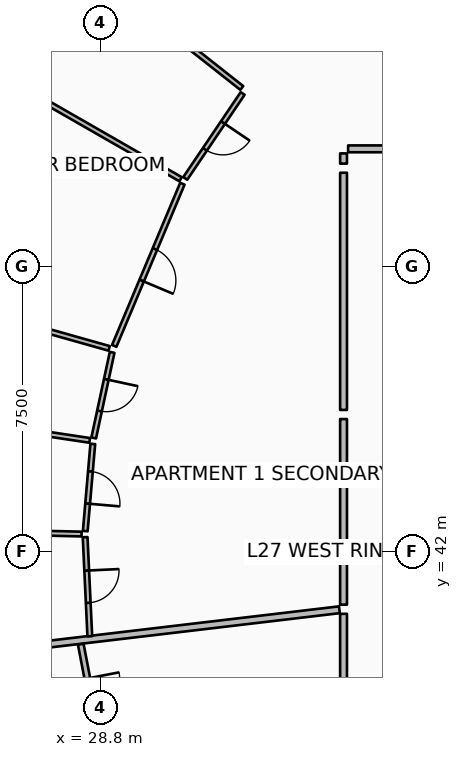
"""IFC4 building model, lengths in metres.
Left out: names, types, materials, properties, quantities, classifications, styles, units other than length and angle.
Written with IfcOpenShell. Run it as: python <this file> out.ifc"""

import sys

from ifc_helpers import new_model, si_unit, direction, frame, frame_2d, origin, place, context, subcontext, project, spatial, rectangle, extrude, element, fill, save


model = new_model("IFC4")
c1 = context("Model", 3, precision=1e-05, world=origin(), true_north=direction((0.0, 1.0)))
c2 = subcontext(c1, "Body", "Model", "MODEL_VIEW")
j1 = project(units=[si_unit("LENGTHUNIT", "METRE"), si_unit("PLANEANGLEUNIT", "RADIAN")], contexts=[c1])
p1 = place(None, origin())
s1 = spatial("IfcSite", under=j1, at=p1, CompositionType="ELEMENT")
p2 = place(p1, origin())
s2 = spatial("IfcBuilding", under=s1, at=p2, CompositionType="ELEMENT")
p3 = place(p2, frame((0.0, 0.0, 108.9)))
s3 = spatial("IfcBuildingStorey", under=s2, at=p3, CompositionType="ELEMENT", Elevation=108.9)
p4 = place(p3, frame((35.091, 40.472, 0.0), z_axis=(0.0, 0.0, 1.0), x_axis=(-0.99306845132, -0.117537445069, 0.0)))
e1 = element("IfcWall", 1, at=p4, inside=s3, PredefinedType="PARTITIONING", context=c2, shape_type="SweptSolid", body=[
    extrude(rectangle(XDim=16.48, YDim=0.18, at=frame_2d((8.24, 0.0))), origin(), (0.0, 0.0, 1.0), 2.94),
])
p5 = place(p3, frame((41.944, 52.6, 0.0), z_axis=(0.0, 0.0, 1.0), x_axis=(-1.0, 0.0, 0.0)))
e2 = element("IfcWall", 2, at=p5, inside=s3, PredefinedType="PARTITIONING", context=c2, shape_type="SweptSolid", body=[
    extrude(rectangle(XDim=6.624, YDim=0.18, at=frame_2d((3.312, 0.0))), origin(), (0.0, 0.0, 1.0), 2.94),
])
p6 = place(p5, frame((2.762, 0.0, 0.0)))
e3 = element("IfcOpeningElement", 3, at=p6, cuts=e2, PredefinedType="OPENING", context=c2, shape_type="SweptSolid", body=[
    extrude(rectangle(XDim=1.1, YDim=2.1, at=frame_2d((0.55, 1.05))), frame((0.0, 0.1, 0.0), z_axis=(0.0, -1.0, 0.0), x_axis=(1.0, 0.0, 0.0)), (0.0, 0.0, 1.0), 0.2),
])
p7 = place(p3, frame((35.2, 52.48, 0.0), z_axis=(0.0, 0.0, 1.0), x_axis=(0.0, -1.0, 0.0)))
e4 = element("IfcWall", 4, at=p7, inside=s3, PredefinedType="PARTITIONING", context=c2, shape_type="SweptSolid", body=[
    extrude(rectangle(XDim=0.269, YDim=0.18, at=frame_2d((0.135, 0.0))), origin(), (0.0, 0.0, 1.0), 2.94),
])
p8 = place(p3, frame((35.2, 51.971, 0.0), z_axis=(0.0, 0.0, 1.0), x_axis=(0.0, -1.0, 0.0)))
e5 = element("IfcWall", 5, at=p8, inside=s3, PredefinedType="PARTITIONING", context=c2, shape_type="SweptSolid", body=[
    extrude(rectangle(XDim=6.241, YDim=0.18, at=frame_2d((3.12, 0.0))), origin(), (0.0, 0.0, 1.0), 2.94),
])
p9 = place(p3, frame((32.522, 54.202, 0.0), z_axis=(0.0, 0.0, 1.0), x_axis=(-0.785296086335, 0.619120389574, 0.0)))
e6 = element("IfcWall", 6, at=p9, inside=s3, PredefinedType="PARTITIONING", context=c2, shape_type="SweptSolid", body=[
    extrude(rectangle(XDim=6.529, YDim=0.125, at=frame_2d((3.265, 0.0))), origin(), (0.0, 0.0, 1.0), 2.94),
])
p10 = place(p3, frame((30.912, 51.8, 0.0), z_axis=(0.0, 0.0, 1.0), x_axis=(-0.867452705788, 0.497519651091, 0.0)))
e7 = element("IfcWall", 7, at=p10, inside=s3, PredefinedType="PARTITIONING", context=c2, shape_type="SweptSolid", body=[
    extrude(rectangle(XDim=6.814, YDim=0.125, at=frame_2d((3.407, 0.0))), origin(), (0.0, 0.0, 1.0), 2.94),
])
p11 = place(p3, frame((32.545, 54.057, 0.0), z_axis=(0.0, 0.0, 1.0), x_axis=(-0.559849013212, -0.828594642998, 0.0)))
e8 = element("IfcWall", 8, at=p11, inside=s3, PredefinedType="PARTITIONING", context=c2, shape_type="SweptSolid", body=[
    extrude(rectangle(XDim=2.697, YDim=0.125, at=frame_2d((1.349, 0.0))), origin(), (0.0, 0.0, 1.0), 2.94),
])
p12 = place(p11, frame((0.924, 0.0, 0.0)))
e9 = element("IfcOpeningElement", 9, at=p12, cuts=e8, PredefinedType="OPENING", context=c2, shape_type="SweptSolid", body=[
    extrude(rectangle(XDim=0.85, YDim=2.06, at=frame_2d((0.425, 1.03))), frame((0.0, 0.073, 0.0), z_axis=(0.0, -1.0, 0.0), x_axis=(1.0, 0.0, 0.0)), (0.0, 0.0, 1.0), 0.145),
])
p13 = place(p3, frame((30.959, 51.682, 0.0), z_axis=(0.0, 0.0, 1.0), x_axis=(-0.387377754923, -0.921921078505, 0.0)))
e10 = element("IfcWall", 10, at=p13, inside=s3, PredefinedType="PARTITIONING", context=c2, shape_type="SweptSolid", body=[
    extrude(rectangle(XDim=4.628, YDim=0.125, at=frame_2d((2.314, 0.0))), origin(), (0.0, 0.0, 1.0), 2.94),
])
p14 = place(p13, frame((1.864, 0.0, 0.0)))
e11 = element("IfcOpeningElement", 11, at=p14, cuts=e10, PredefinedType="OPENING", context=c2, shape_type="SweptSolid", body=[
    extrude(rectangle(XDim=0.9, YDim=2.08, at=frame_2d((0.45, 1.04))), frame((0.0, 0.073, 0.0), z_axis=(0.0, -1.0, 0.0), x_axis=(1.0, 0.0, 0.0)), (0.0, 0.0, 1.0), 0.145),
])
p15 = place(p3, frame((35.2, 45.49, 0.0), z_axis=(0.0, 0.0, 1.0), x_axis=(0.0, -1.0, 0.0)))
e12 = element("IfcWall", 12, at=p15, inside=s3, PredefinedType="PARTITIONING", context=c2, shape_type="SweptSolid", body=[
    extrude(rectangle(XDim=4.885, YDim=0.18, at=frame_2d((2.442, 0.0))), origin(), (0.0, 0.0, 1.0), 2.94),
])
p16 = place(p3, frame((29.031, 47.35, 0.0), z_axis=(0.0, 0.0, 1.0), x_axis=(-0.962455027906, 0.271441189317, 0.0)))
e13 = element("IfcWall", 13, at=p16, inside=s3, PredefinedType="PARTITIONING", context=c2, shape_type="SweptSolid", body=[
    extrude(rectangle(XDim=8.862, YDim=0.125, at=frame_2d((4.431, 0.0))), origin(), (0.0, 0.0, 1.0), 2.94),
])
p17 = place(p3, frame((28.52, 44.929, 0.0), z_axis=(0.0, 0.0, 1.0), x_axis=(-0.988886383278, 0.148673201912, 0.0)))
e14 = element("IfcWall", 14, at=p17, inside=s3, PredefinedType="PARTITIONING", context=c2, shape_type="SweptSolid", body=[
    extrude(rectangle(XDim=8.969, YDim=0.125, at=frame_2d((4.485, 0.0))), origin(), (0.0, 0.0, 1.0), 2.94),
])
p18 = place(p3, frame((28.306, 42.464, 0.0), z_axis=(0.0, 0.0, 1.0), x_axis=(-0.999722179252, 0.023570411771, 0.0)))
e15 = element("IfcWall", 15, at=p18, inside=s3, PredefinedType="PARTITIONING", context=c2, shape_type="SweptSolid", body=[
    extrude(rectangle(XDim=9.426, YDim=0.125, at=frame_2d((4.713, 0.0))), origin(), (0.0, 0.0, 1.0), 2.94),
])
p19 = place(p3, frame((29.11, 47.244, 0.0), z_axis=(0.0, 0.0, 1.0), x_axis=(-0.210470334655, -0.977600244594, 0.0)))
e16 = element("IfcWall", 16, at=p19, inside=s3, PredefinedType="PARTITIONING", context=c2, shape_type="SweptSolid", body=[
    extrude(rectangle(XDim=2.302, YDim=0.125, at=frame_2d((1.151, 0.0))), origin(), (0.0, 0.0, 1.0), 2.94),
])
p20 = place(p19, frame((0.726, 0.0, 0.0)))
e17 = element("IfcOpeningElement", 17, at=p20, cuts=e16, PredefinedType="OPENING", context=c2, shape_type="SweptSolid", body=[
    extrude(rectangle(XDim=0.85, YDim=2.06, at=frame_2d((0.425, 1.03))), frame((0.0, 0.073, 0.0), z_axis=(0.0, -1.0, 0.0), x_axis=(1.0, 0.0, 0.0)), (0.0, 0.0, 1.0), 0.145),
])
p21 = place(p3, frame((28.602, 44.836, 0.0), z_axis=(0.0, 0.0, 1.0), x_axis=(-0.086309330274, -0.996268387287, 0.0)))
e18 = element("IfcWall", 18, at=p21, inside=s3, PredefinedType="PARTITIONING", context=c2, shape_type="SweptSolid", body=[
    extrude(rectangle(XDim=2.302, YDim=0.125, at=frame_2d((1.151, 0.0))), origin(), (0.0, 0.0, 1.0), 2.94),
])
p22 = place(p21, frame((0.726, 0.0, 0.0)))
e19 = element("IfcOpeningElement", 19, at=p22, cuts=e18, PredefinedType="OPENING", context=c2, shape_type="SweptSolid", body=[
    extrude(rectangle(XDim=0.85, YDim=2.06, at=frame_2d((0.425, 1.03))), frame((0.0, 0.073, 0.0), z_axis=(0.0, -1.0, 0.0), x_axis=(1.0, 0.0, 0.0)), (0.0, 0.0, 1.0), 0.145),
])
p23 = place(p3, frame((28.4, 42.382, 0.0), z_axis=(0.0, 0.0, 1.0), x_axis=(0.047147361322, -0.998887944827, 0.0)))
e20 = element("IfcWall", 20, at=p23, inside=s3, PredefinedType="PARTITIONING", context=c2, shape_type="SweptSolid", body=[
    extrude(rectangle(XDim=2.61, YDim=0.125, at=frame_2d((1.305, 0.0))), origin(), (0.0, 0.0, 1.0), 2.94),
])
p24 = place(p23, frame((0.88, 0.0, 0.0)))
e21 = element("IfcOpeningElement", 21, at=p24, cuts=e20, PredefinedType="OPENING", context=c2, shape_type="SweptSolid", body=[
    extrude(rectangle(XDim=0.85, YDim=2.06, at=frame_2d((0.425, 1.03))), frame((0.0, 0.073, 0.0), z_axis=(0.0, -1.0, 0.0), x_axis=(1.0, 0.0, 0.0)), (0.0, 0.0, 1.0), 0.145),
])
p25 = place(p3, frame((35.2, 40.365, 0.0), z_axis=(0.0, 0.0, 1.0), x_axis=(0.0, -1.0, 0.0)))
e22 = element("IfcWall", 22, at=p25, inside=s3, PredefinedType="PARTITIONING", context=c2, shape_type="SweptSolid", body=[
    extrude(rectangle(XDim=5.413, YDim=0.18, at=frame_2d((2.707, 0.0))), origin(), (0.0, 0.0, 1.0), 2.94),
])
p26 = place(p3, frame((28.285, 39.566, 0.0), z_axis=(0.0, 0.0, 1.0), x_axis=(0.189069796262, -0.98196365113, 0.0)))
e23 = element("IfcWall", 23, at=p26, inside=s3, PredefinedType="PARTITIONING", context=c2, shape_type="SweptSolid", body=[
    extrude(rectangle(XDim=2.687, YDim=0.15, at=frame_2d((1.344, 0.0))), origin(), (0.0, 0.0, 1.0), 2.94),
])
p27 = place(p26, frame((0.918, 0.0, 0.0)))
e24 = element("IfcOpeningElement", 24, at=p27, cuts=e23, PredefinedType="OPENING", context=c2, shape_type="SweptSolid", body=[
    extrude(rectangle(XDim=0.85, YDim=2.06, at=frame_2d((0.425, 1.03))), frame((0.0, 0.085, 0.0), z_axis=(0.0, -1.0, 0.0), x_axis=(1.0, 0.0, 0.0)), (0.0, 0.0, 1.0), 0.17),
])
p28 = place(p12, origin())
e25 = element("IfcDoor", 25, at=p28, inside=s3, OperationType="SINGLE_SWING_LEFT", PredefinedType="DOOR", context=c2, shape_type="SweptSolid", body=[
    extrude(rectangle(XDim=0.85, YDim=2.06, at=frame_2d((0.425, 1.03))), frame((0.0, 0.025, 0.0), z_axis=(0.0, -1.0, 0.0), x_axis=(1.0, 0.0, 0.0)), (0.0, 0.0, 1.0), 0.05),
])
fill(e9, e25)
p29 = place(p14, origin())
e26 = element("IfcDoor", 26, at=p29, inside=s3, OperationType="SINGLE_SWING_RIGHT", PredefinedType="DOOR", context=c2, shape_type="SweptSolid", body=[
    extrude(rectangle(XDim=0.9, YDim=2.08, at=frame_2d((0.45, 1.04))), frame((0.0, 0.025, 0.0), z_axis=(0.0, -1.0, 0.0), x_axis=(1.0, 0.0, 0.0)), (0.0, 0.0, 1.0), 0.05),
])
fill(e11, e26)
p30 = place(p20, origin())
e27 = element("IfcDoor", 27, at=p30, inside=s3, OperationType="SINGLE_SWING_LEFT", PredefinedType="DOOR", context=c2, shape_type="SweptSolid", body=[
    extrude(rectangle(XDim=0.85, YDim=2.06, at=frame_2d((0.425, 1.03))), frame((0.0, 0.025, 0.0), z_axis=(0.0, -1.0, 0.0), x_axis=(1.0, 0.0, 0.0)), (0.0, 0.0, 1.0), 0.05),
])
fill(e17, e27)
p31 = place(p22, origin())
e28 = element("IfcDoor", 28, at=p31, inside=s3, OperationType="SINGLE_SWING_RIGHT", PredefinedType="DOOR", context=c2, shape_type="SweptSolid", body=[
    extrude(rectangle(XDim=0.85, YDim=2.06, at=frame_2d((0.425, 1.03))), frame((0.0, 0.025, 0.0), z_axis=(0.0, -1.0, 0.0), x_axis=(1.0, 0.0, 0.0)), (0.0, 0.0, 1.0), 0.05),
])
fill(e19, e28)
p32 = place(p24, origin())
e29 = element("IfcDoor", 29, at=p32, inside=s3, OperationType="SINGLE_SWING_LEFT", PredefinedType="DOOR", context=c2, shape_type="SweptSolid", body=[
    extrude(rectangle(XDim=0.85, YDim=2.06, at=frame_2d((0.425, 1.03))), frame((0.0, 0.025, 0.0), z_axis=(0.0, -1.0, 0.0), x_axis=(1.0, 0.0, 0.0)), (0.0, 0.0, 1.0), 0.05),
])
fill(e21, e29)
save(model, sys.argv[1])
